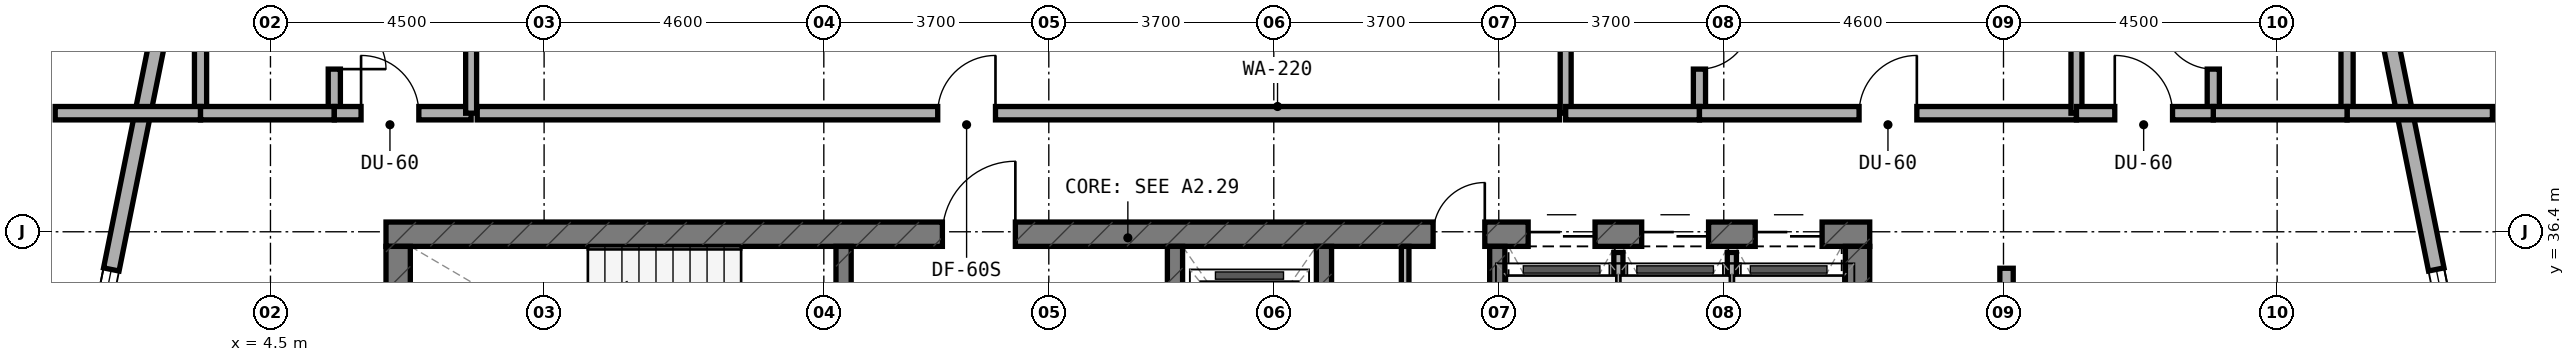
"""IFC4 building model, lengths in metres.
Left out: names, types, materials, properties, quantities, classifications, styles, units other than length and angle.
Written with IfcOpenShell. Run it as: python <this file> out.ifc"""

import sys

from ifc_helpers import new_model, si_unit, direction, frame, frame_2d, origin, place, context, subcontext, project, spatial, rectangle, extrude, element, fill, save


model = new_model("IFC4")
c1 = context("Model", 3, precision=1e-05, world=origin(), true_north=direction((0.0, 1.0)))
c2 = subcontext(c1, "Body", "Model", "MODEL_VIEW")
j1 = project(units=[si_unit("LENGTHUNIT", "METRE"), si_unit("PLANEANGLEUNIT", "RADIAN")], contexts=[c1])
p1 = place(None, origin())
s1 = spatial("IfcSite", under=j1, at=p1, CompositionType="ELEMENT")
p2 = place(p1, origin())
s2 = spatial("IfcBuilding", under=s1, at=p2, CompositionType="ELEMENT")
p3 = place(p2, frame((0.0, 0.0, 127.5)))
s3 = spatial("IfcBuildingStorey", under=s2, at=p3, CompositionType="ELEMENT", Elevation=127.5)
p4 = place(p3, frame((6.4, 36.36, 0.0), z_axis=(0.0, 0.0, 1.0), x_axis=(1.0, 0.0, 0.0)))
e1 = element("IfcWall", 1, at=p4, inside=s3, PredefinedType="SHEAR", context=c2, shape_type="SweptSolid", body=[
    extrude(rectangle(XDim=24.4, YDim=0.4, at=frame_2d((12.2, 0.0))), origin(), (0.0, 0.0, 1.0), 3.5),
])
p5 = place(p4, frame((9.15, 0.0, 0.0)))
e2 = element("IfcOpeningElement", 2, at=p5, cuts=e1, PredefinedType="OPENING", context=c2, shape_type="SweptSolid", body=[
    extrude(rectangle(XDim=1.2, YDim=2.15, at=frame_2d((0.6, 1.075))), frame((0.0, 0.21, 0.0), z_axis=(0.0, -1.0, 0.0), x_axis=(1.0, 0.0, 0.0)), (0.0, 0.0, 1.0), 0.42),
])
p6 = place(p4, frame((17.22, 0.0, 0.0)))
e3 = element("IfcOpeningElement", 3, at=p6, cuts=e1, PredefinedType="OPENING", context=c2, shape_type="SweptSolid", body=[
    extrude(rectangle(XDim=0.85, YDim=2.1, at=frame_2d((0.425, 1.05))), frame((0.0, 0.21, 0.0), z_axis=(0.0, -1.0, 0.0), x_axis=(1.0, 0.0, 0.0)), (0.0, 0.0, 1.0), 0.42),
])
p7 = place(p4, frame((18.783, 0.0, 0.0)))
e4 = element("IfcOpeningElement", 4, at=p7, cuts=e1, PredefinedType="OPENING", context=c2, shape_type="SweptSolid", body=[
    extrude(rectangle(XDim=1.1, YDim=2.15, at=frame_2d((0.55, 1.075))), frame((0.0, 0.21, 0.0), z_axis=(0.0, -1.0, 0.0), x_axis=(1.0, 0.0, 0.0)), (0.0, 0.0, 1.0), 0.42),
])
p8 = place(p4, frame((20.65, 0.0, 0.0)))
e5 = element("IfcOpeningElement", 5, at=p8, cuts=e1, PredefinedType="OPENING", context=c2, shape_type="SweptSolid", body=[
    extrude(rectangle(XDim=1.1, YDim=2.15, at=frame_2d((0.55, 1.075))), frame((0.0, 0.21, 0.0), z_axis=(0.0, -1.0, 0.0), x_axis=(1.0, 0.0, 0.0)), (0.0, 0.0, 1.0), 0.42),
])
p9 = place(p4, frame((22.517, 0.0, 0.0)))
e6 = element("IfcOpeningElement", 6, at=p9, cuts=e1, PredefinedType="OPENING", context=c2, shape_type="SweptSolid", body=[
    extrude(rectangle(XDim=1.1, YDim=2.15, at=frame_2d((0.55, 1.075))), frame((0.0, 0.21, 0.0), z_axis=(0.0, -1.0, 0.0), x_axis=(1.0, 0.0, 0.0)), (0.0, 0.0, 1.0), 0.42),
])
for number, where, z_axis, x_axis in (
    (7, (6.6, 33.0, 0.0), (0.0, 0.0, 1.0), (0.0, 1.0, 0.0)),
    (8, (30.6, 33.0, 0.0), (0.0, 0.0, 1.0), (0.0, 1.0, 0.0)),
):
    element("IfcWall", number, at=place(p3, frame(where, z_axis=z_axis, x_axis=x_axis)), inside=s3, PredefinedType="SHEAR", context=c2, shape_type="SweptSolid", body=[
        extrude(rectangle(XDim=3.16, YDim=0.4, at=frame_2d((1.58, 0.0))), origin(), (0.0, 0.0, 1.0), 3.5),
    ])
p10 = place(p3, frame((13.925, 33.0, 0.0), z_axis=(0.0, 0.0, 1.0), x_axis=(0.0, 1.0, 0.0)))
e9 = element("IfcWall", 9, at=p10, inside=s3, PredefinedType="STANDARD", context=c2, shape_type="SweptSolid", body=[
    extrude(rectangle(XDim=3.16, YDim=0.25, at=frame_2d((1.58, 0.0))), origin(), (0.0, 0.0, 1.0), 3.22),
])
p11 = place(p10, frame((0.98, 0.0, 0.0)))
e10 = element("IfcOpeningElement", 10, at=p11, cuts=e9, PredefinedType="OPENING", context=c2, shape_type="SweptSolid", body=[
    extrude(rectangle(XDim=1.1, YDim=2.15, at=frame_2d((0.55, 1.075))), frame((0.0, 0.135, 0.0), z_axis=(0.0, -1.0, 0.0), x_axis=(1.0, 0.0, 0.0)), (0.0, 0.0, 1.0), 0.27),
])
p12 = place(p3, frame((19.375, 33.0, 0.0), z_axis=(0.0, 0.0, 1.0), x_axis=(0.0, 1.0, 0.0)))
e11 = element("IfcWall", 11, at=p12, inside=s3, PredefinedType="STANDARD", context=c2, shape_type="SweptSolid", body=[
    extrude(rectangle(XDim=3.16, YDim=0.25, at=frame_2d((1.58, 0.0))), origin(), (0.0, 0.0, 1.0), 3.22),
])
p13 = place(p12, frame((0.98, 0.0, 0.0)))
e12 = element("IfcOpeningElement", 12, at=p13, cuts=e11, PredefinedType="OPENING", context=c2, shape_type="SweptSolid", body=[
    extrude(rectangle(XDim=1.1, YDim=2.15, at=frame_2d((0.55, 1.075))), frame((0.0, 0.135, 0.0), z_axis=(0.0, -1.0, 0.0), x_axis=(1.0, 0.0, 0.0)), (0.0, 0.0, 1.0), 0.27),
])
for number, where, z_axis, x_axis in (
    (13, (21.825, 33.0, 0.0), (0.0, 0.0, 1.0), (0.0, 1.0, 0.0)),
    (14, (24.675, 33.0, 0.0), (0.0, 0.0, 1.0), (0.0, 1.0, 0.0)),
):
    element("IfcWall", number, at=place(p3, frame(where, z_axis=z_axis, x_axis=x_axis)), inside=s3, PredefinedType="STANDARD", context=c2, shape_type="SweptSolid", body=[
        extrude(rectangle(XDim=3.16, YDim=0.25, at=frame_2d((1.58, 0.0))), origin(), (0.0, 0.0, 1.0), 3.22),
    ])
p14 = place(p3, frame((41.084, 30.98, 0.0), z_axis=(0.0, 0.0, 1.0), x_axis=(-0.197435082048, 0.980315963543, 0.0)))
e15 = element("IfcWall", 15, at=p14, inside=s3, PredefinedType="STANDARD", context=c2, shape_type="SweptSolid", body=[
    extrude(rectangle(XDim=9.183, YDim=0.26, at=frame_2d((4.591, 0.0))), origin(), (0.0, 0.0, 1.0), 3.22),
])
p15 = place(p14, frame((2.497, 0.0, 0.8)))
e16 = element("IfcOpeningElement", 16, at=p15, cuts=e15, PredefinedType="OPENING", context=c2, shape_type="SweptSolid", body=[
    extrude(rectangle(XDim=2.4, YDim=1.6, at=frame_2d((1.2, 0.8))), frame((0.0, 0.14, 0.0), z_axis=(0.0, -1.0, 0.0), x_axis=(1.0, 0.0, 0.0)), (0.0, 0.0, 1.0), 0.28),
])
p16 = place(p3, frame((2.729, 39.982, 0.0), z_axis=(0.0, 0.0, 1.0), x_axis=(-0.197435082048, -0.980315963543, 0.0)))
e17 = element("IfcWall", 17, at=p16, inside=s3, PredefinedType="STANDARD", context=c2, shape_type="SweptSolid", body=[
    extrude(rectangle(XDim=9.183, YDim=0.26, at=frame_2d((4.591, 0.0))), origin(), (0.0, 0.0, 1.0), 3.22),
])
p17 = place(p16, frame((4.286, 0.0, 0.8)))
e18 = element("IfcOpeningElement", 18, at=p17, cuts=e17, PredefinedType="OPENING", context=c2, shape_type="SweptSolid", body=[
    extrude(rectangle(XDim=2.4, YDim=1.6, at=frame_2d((1.2, 0.8))), frame((0.0, 0.14, 0.0), z_axis=(0.0, -1.0, 0.0), x_axis=(1.0, 0.0, 0.0)), (0.0, 0.0, 1.0), 0.28),
])
p18 = place(p3, frame((23.16, 34.82, 0.0), z_axis=(0.0, 0.0, 1.0), x_axis=(0.0, 1.0, 0.0)))
e19 = element("IfcWall", 19, at=p18, inside=s3, PredefinedType="PARTITIONING", context=c2, shape_type="SweptSolid", body=[
    extrude(rectangle(XDim=1.34, YDim=0.125, at=frame_2d((0.67, 0.0))), origin(), (0.0, 0.0, 1.0), 3.22),
])
p19 = place(p3, frame((26.667, 33.1, 0.0), z_axis=(0.0, 0.0, 1.0), x_axis=(0.0, 1.0, 0.0)))
e20 = element("IfcWall", 20, at=p19, inside=s3, PredefinedType="PARTITIONING", context=c2, shape_type="SweptSolid", body=[
    extrude(rectangle(XDim=2.96, YDim=0.15, at=frame_2d((1.48, 0.0))), origin(), (0.0, 0.0, 1.0), 3.22),
])
p20 = place(p3, frame((28.533, 33.1, 0.0), z_axis=(0.0, 0.0, 1.0), x_axis=(0.0, 1.0, 0.0)))
e21 = element("IfcWall", 21, at=p20, inside=s3, PredefinedType="PARTITIONING", context=c2, shape_type="SweptSolid", body=[
    extrude(rectangle(XDim=2.96, YDim=0.15, at=frame_2d((1.48, 0.0))), origin(), (0.0, 0.0, 1.0), 2.695),
])
p21 = place(p3, frame((5.55, 38.45, 0.0), z_axis=(0.0, 0.0, 1.0), x_axis=(0.0, 1.0, 0.0)))
e22 = element("IfcWall", 22, at=p21, inside=s3, PredefinedType="PLUMBINGWALL", context=c2, shape_type="SweptSolid", body=[
    extrude(rectangle(XDim=2.1, YDim=0.2, at=frame_2d((1.05, 0.0))), origin(), (0.0, 0.0, 1.0), 3.22),
])
p22 = place(p21, frame((0.625, 0.0, 0.0)))
e23 = element("IfcOpeningElement", 23, at=p22, cuts=e22, PredefinedType="OPENING", context=c2, shape_type="SweptSolid", body=[
    extrude(rectangle(XDim=0.85, YDim=2.1, at=frame_2d((0.425, 1.05))), frame((0.0, 0.11, 0.0), z_axis=(0.0, -1.0, 0.0), x_axis=(1.0, 0.0, 0.0)), (0.0, 0.0, 1.0), 0.22),
])
p23 = place(p3, frame((3.35, 38.45, 0.0), z_axis=(0.0, 0.0, 1.0), x_axis=(0.0, 1.0, 0.0)))
e24 = element("IfcWall", 24, at=p23, inside=s3, PredefinedType="PLUMBINGWALL", context=c2, shape_type="SweptSolid", body=[
    extrude(rectangle(XDim=2.1, YDim=0.2, at=frame_2d((1.05, 0.0))), origin(), (0.0, 0.0, 1.0), 3.22),
])
p24 = place(p3, frame((0.96, 38.35, 0.0), z_axis=(0.0, 0.0, 1.0), x_axis=(1.0, 0.0, 0.0)))
e25 = element("IfcWall", 25, at=p24, inside=s3, PredefinedType="SOLIDWALL", context=c2, shape_type="SweptSolid", body=[
    extrude(rectangle(XDim=2.39, YDim=0.22, at=frame_2d((1.195, 0.0))), origin(), (0.0, 0.0, 1.0), 3.22),
])
p25 = place(p3, frame((3.35, 38.35, 0.0), z_axis=(0.0, 0.0, 1.0), x_axis=(1.0, 0.0, 0.0)))
e26 = element("IfcWall", 26, at=p25, inside=s3, PredefinedType="SOLIDWALL", context=c2, shape_type="SweptSolid", body=[
    extrude(rectangle(XDim=2.2, YDim=0.22, at=frame_2d((1.1, 0.0))), origin(), (0.0, 0.0, 1.0), 3.22),
])
p26 = place(p3, frame((5.55, 38.35, 0.0), z_axis=(0.0, 0.0, 1.0), x_axis=(1.0, 0.0, 0.0)))
e27 = element("IfcWall", 27, at=p26, inside=s3, PredefinedType="SOLIDWALL", context=c2, shape_type="SweptSolid", body=[
    extrude(rectangle(XDim=2.25, YDim=0.22, at=frame_2d((1.125, 0.0))), origin(), (0.0, 0.0, 1.0), 2.695),
])
p27 = place(p26, frame((0.44, 0.0, 0.0)))
e28 = element("IfcOpeningElement", 28, at=p27, cuts=e27, PredefinedType="OPENING", context=c2, shape_type="SweptSolid", body=[
    extrude(rectangle(XDim=0.95, YDim=2.1, at=frame_2d((0.475, 1.05))), frame((0.0, 0.12, 0.0), z_axis=(0.0, -1.0, 0.0), x_axis=(1.0, 0.0, 0.0)), (0.0, 0.0, 1.0), 0.24),
])
p28 = place(p3, frame((7.8, 38.35, 0.0), z_axis=(0.0, 0.0, 1.0), x_axis=(0.0, 1.0, 0.0)))
e29 = element("IfcWall", 29, at=p28, inside=s3, PredefinedType="SOLIDWALL", context=c2, shape_type="SweptSolid", body=[
    extrude(rectangle(XDim=5.351, YDim=0.18, at=frame_2d((2.675, 0.0))), origin(), (0.0, 0.0, 1.0), 2.695),
])
p29 = place(p3, frame((7.9, 38.35, 0.0), z_axis=(0.0, 0.0, 1.0), x_axis=(1.0, 0.0, 0.0)))
e30 = element("IfcWall", 30, at=p29, inside=s3, PredefinedType="SOLIDWALL", context=c2, shape_type="SweptSolid", body=[
    extrude(rectangle(XDim=17.8, YDim=0.22, at=frame_2d((8.9, 0.0))), origin(), (0.0, 0.0, 1.0), 2.695),
])
p30 = place(p29, frame((7.573, 0.0, 0.0)))
e31 = element("IfcOpeningElement", 31, at=p30, cuts=e30, PredefinedType="OPENING", context=c2, shape_type="SweptSolid", body=[
    extrude(rectangle(XDim=0.95, YDim=2.1, at=frame_2d((0.475, 1.05))), frame((0.0, 0.12, 0.0), z_axis=(0.0, -1.0, 0.0), x_axis=(1.0, 0.0, 0.0)), (0.0, 0.0, 1.0), 0.24),
])
p31 = place(p3, frame((25.8, 38.35, 0.0), z_axis=(0.0, 0.0, 1.0), x_axis=(0.0, 1.0, 0.0)))
e32 = element("IfcWall", 32, at=p31, inside=s3, PredefinedType="SOLIDWALL", context=c2, shape_type="SweptSolid", body=[
    extrude(rectangle(XDim=6.79, YDim=0.18, at=frame_2d((3.395, 0.0))), origin(), (0.0, 0.0, 1.0), 2.695),
])
p32 = place(p3, frame((28.0, 38.45, 0.0), z_axis=(0.0, 0.0, 1.0), x_axis=(0.0, 1.0, 0.0)))
e33 = element("IfcWall", 33, at=p32, inside=s3, PredefinedType="PLUMBINGWALL", context=c2, shape_type="SweptSolid", body=[
    extrude(rectangle(XDim=2.1, YDim=0.2, at=frame_2d((1.05, 0.0))), origin(), (0.0, 0.0, 1.0), 2.745),
])
p33 = place(p32, frame((0.625, 0.0, 0.0)))
e34 = element("IfcOpeningElement", 34, at=p33, cuts=e33, PredefinedType="OPENING", context=c2, shape_type="SweptSolid", body=[
    extrude(rectangle(XDim=0.85, YDim=2.1, at=frame_2d((0.425, 1.05))), frame((0.0, 0.11, 0.0), z_axis=(0.0, -1.0, 0.0), x_axis=(1.0, 0.0, 0.0)), (0.0, 0.0, 1.0), 0.22),
])
p34 = place(p3, frame((25.8, 38.35, 0.0), z_axis=(0.0, 0.0, 1.0), x_axis=(1.0, 0.0, 0.0)))
e35 = element("IfcWall", 35, at=p34, inside=s3, PredefinedType="SOLIDWALL", context=c2, shape_type="SweptSolid", body=[
    extrude(rectangle(XDim=2.2, YDim=0.22, at=frame_2d((1.1, 0.0))), origin(), (0.0, 0.0, 1.0), 2.695),
])
p35 = place(p3, frame((28.0, 38.35, 0.0), z_axis=(0.0, 0.0, 1.0), x_axis=(1.0, 0.0, 0.0)))
e36 = element("IfcWall", 36, at=p35, inside=s3, PredefinedType="SOLIDWALL", context=c2, shape_type="SweptSolid", body=[
    extrude(rectangle(XDim=6.2, YDim=0.22, at=frame_2d((3.1, 0.0))), origin(), (0.0, 0.0, 1.0), 2.695),
])
p36 = place(p35, frame((2.625, 0.0, 0.0)))
e37 = element("IfcOpeningElement", 37, at=p36, cuts=e36, PredefinedType="OPENING", context=c2, shape_type="SweptSolid", body=[
    extrude(rectangle(XDim=0.95, YDim=2.1, at=frame_2d((0.475, 1.05))), frame((0.0, 0.12, 0.0), z_axis=(0.0, -1.0, 0.0), x_axis=(1.0, 0.0, 0.0)), (0.0, 0.0, 1.0), 0.24),
])
p37 = place(p3, frame((34.2, 38.35, 0.0), z_axis=(0.0, 0.0, 1.0), x_axis=(0.0, 1.0, 0.0)))
e38 = element("IfcWall", 38, at=p37, inside=s3, PredefinedType="SOLIDWALL", context=c2, shape_type="SweptSolid", body=[
    extrude(rectangle(XDim=5.351, YDim=0.18, at=frame_2d((2.675, 0.0))), origin(), (0.0, 0.0, 1.0), 2.695),
])
p38 = place(p3, frame((36.45, 38.45, 0.0), z_axis=(0.0, 0.0, 1.0), x_axis=(0.0, 1.0, 0.0)))
e39 = element("IfcWall", 39, at=p38, inside=s3, PredefinedType="PLUMBINGWALL", context=c2, shape_type="SweptSolid", body=[
    extrude(rectangle(XDim=2.1, YDim=0.2, at=frame_2d((1.05, 0.0))), origin(), (0.0, 0.0, 1.0), 3.22),
])
p39 = place(p38, frame((0.625, 0.0, 0.0)))
e40 = element("IfcOpeningElement", 40, at=p39, cuts=e39, PredefinedType="OPENING", context=c2, shape_type="SweptSolid", body=[
    extrude(rectangle(XDim=0.85, YDim=2.1, at=frame_2d((0.425, 1.05))), frame((0.0, 0.11, 0.0), z_axis=(0.0, -1.0, 0.0), x_axis=(1.0, 0.0, 0.0)), (0.0, 0.0, 1.0), 0.22),
])
p40 = place(p3, frame((38.65, 38.45, 0.0), z_axis=(0.0, 0.0, 1.0), x_axis=(0.0, 1.0, 0.0)))
e41 = element("IfcWall", 41, at=p40, inside=s3, PredefinedType="PLUMBINGWALL", context=c2, shape_type="SweptSolid", body=[
    extrude(rectangle(XDim=2.1, YDim=0.2, at=frame_2d((1.05, 0.0))), origin(), (0.0, 0.0, 1.0), 3.22),
])
p41 = place(p3, frame((38.65, 38.35, 0.0), z_axis=(0.0, 0.0, 1.0), x_axis=(1.0, 0.0, 0.0)))
e42 = element("IfcWall", 42, at=p41, inside=s3, PredefinedType="SOLIDWALL", context=c2, shape_type="SweptSolid", body=[
    extrude(rectangle(XDim=2.39, YDim=0.22, at=frame_2d((1.195, 0.0))), origin(), (0.0, 0.0, 1.0), 3.22),
])
p42 = place(p3, frame((36.45, 38.35, 0.0), z_axis=(0.0, 0.0, 1.0), x_axis=(1.0, 0.0, 0.0)))
e43 = element("IfcWall", 43, at=p42, inside=s3, PredefinedType="SOLIDWALL", context=c2, shape_type="SweptSolid", body=[
    extrude(rectangle(XDim=2.2, YDim=0.22, at=frame_2d((1.1, 0.0))), origin(), (0.0, 0.0, 1.0), 3.22),
])
p43 = place(p3, frame((34.2, 38.35, 0.0), z_axis=(0.0, 0.0, 1.0), x_axis=(1.0, 0.0, 0.0)))
e44 = element("IfcWall", 44, at=p43, inside=s3, PredefinedType="SOLIDWALL", context=c2, shape_type="SweptSolid", body=[
    extrude(rectangle(XDim=2.25, YDim=0.22, at=frame_2d((1.125, 0.0))), origin(), (0.0, 0.0, 1.0), 2.695),
])
p44 = place(p43, frame((0.63, 0.0, 0.0)))
e45 = element("IfcOpeningElement", 45, at=p44, cuts=e44, PredefinedType="OPENING", context=c2, shape_type="SweptSolid", body=[
    extrude(rectangle(XDim=0.95, YDim=2.1, at=frame_2d((0.475, 1.05))), frame((0.0, 0.12, 0.0), z_axis=(0.0, -1.0, 0.0), x_axis=(1.0, 0.0, 0.0)), (0.0, 0.0, 1.0), 0.24),
])
p45 = place(p3, frame((33.05, 27.2, 0.0), z_axis=(0.0, 0.0, 1.0), x_axis=(0.0, 1.0, 0.0)))
e46 = element("IfcWall", 46, at=p45, inside=s3, PredefinedType="SOLIDWALL", context=c2, shape_type="SweptSolid", body=[
    extrude(rectangle(XDim=8.6, YDim=0.22, at=frame_2d((4.3, 0.0))), origin(), (0.0, 0.0, 1.0), 2.695),
])
p46 = place(p45, frame((3.825, 0.0, 0.0)))
e47 = element("IfcOpeningElement", 47, at=p46, cuts=e46, PredefinedType="OPENING", context=c2, shape_type="SweptSolid", body=[
    extrude(rectangle(XDim=0.95, YDim=2.1, at=frame_2d((0.475, 1.05))), frame((0.0, 0.12, 0.0), z_axis=(0.0, -1.0, 0.0), x_axis=(1.0, 0.0, 0.0)), (0.0, 0.0, 1.0), 0.24),
])
p47 = place(p15, origin())
e48 = element("IfcWindow", 48, at=p47, inside=s3, PartitioningType="SINGLE_PANEL", PredefinedType="WINDOW", context=c2, shape_type="SweptSolid", body=[
    extrude(rectangle(XDim=2.4, YDim=1.6, at=frame_2d((1.2, 0.8))), frame((0.0, 0.03, 0.0), z_axis=(0.0, -1.0, 0.0), x_axis=(1.0, 0.0, 0.0)), (0.0, 0.0, 1.0), 0.06),
])
fill(e16, e48)
p48 = place(p17, origin())
e49 = element("IfcWindow", 49, at=p48, inside=s3, PartitioningType="SINGLE_PANEL", PredefinedType="WINDOW", context=c2, shape_type="SweptSolid", body=[
    extrude(rectangle(XDim=2.4, YDim=1.6, at=frame_2d((1.2, 0.8))), frame((0.0, 0.03, 0.0), z_axis=(0.0, -1.0, 0.0), x_axis=(1.0, 0.0, 0.0)), (0.0, 0.0, 1.0), 0.06),
])
fill(e18, e49)
p49 = place(p5, origin())
e50 = element("IfcDoor", 50, at=p49, inside=s3, OperationType="SINGLE_SWING_RIGHT", PredefinedType="DOOR", context=c2, shape_type="SweptSolid", body=[
    extrude(rectangle(XDim=1.2, YDim=2.15, at=frame_2d((0.6, 1.075))), frame((0.0, 0.025, 0.0), z_axis=(0.0, -1.0, 0.0), x_axis=(1.0, 0.0, 0.0)), (0.0, 0.0, 1.0), 0.05),
])
fill(e2, e50)
p50 = place(p6, origin())
e51 = element("IfcDoor", 51, at=p50, inside=s3, OperationType="SINGLE_SWING_RIGHT", PredefinedType="DOOR", context=c2, shape_type="SweptSolid", body=[
    extrude(rectangle(XDim=0.85, YDim=2.1, at=frame_2d((0.425, 1.05))), frame((0.0, 0.025, 0.0), z_axis=(0.0, -1.0, 0.0), x_axis=(1.0, 0.0, 0.0)), (0.0, 0.0, 1.0), 0.05),
])
fill(e3, e51)
p51 = place(p7, origin())
e52 = element("IfcDoor", 52, at=p51, inside=s3, OperationType="DOUBLE_DOOR_SLIDING", PredefinedType="DOOR", context=c2, shape_type="SweptSolid", body=[
    extrude(rectangle(XDim=1.1, YDim=2.15, at=frame_2d((0.55, 1.075))), frame((0.0, 0.025, 0.0), z_axis=(0.0, -1.0, 0.0), x_axis=(1.0, 0.0, 0.0)), (0.0, 0.0, 1.0), 0.05),
])
fill(e4, e52)
p52 = place(p8, origin())
e53 = element("IfcDoor", 53, at=p52, inside=s3, OperationType="DOUBLE_DOOR_SLIDING", PredefinedType="DOOR", context=c2, shape_type="SweptSolid", body=[
    extrude(rectangle(XDim=1.1, YDim=2.15, at=frame_2d((0.55, 1.075))), frame((0.0, 0.025, 0.0), z_axis=(0.0, -1.0, 0.0), x_axis=(1.0, 0.0, 0.0)), (0.0, 0.0, 1.0), 0.05),
])
fill(e5, e53)
p53 = place(p9, origin())
e54 = element("IfcDoor", 54, at=p53, inside=s3, OperationType="DOUBLE_DOOR_SLIDING", PredefinedType="DOOR", context=c2, shape_type="SweptSolid", body=[
    extrude(rectangle(XDim=1.1, YDim=2.15, at=frame_2d((0.55, 1.075))), frame((0.0, 0.025, 0.0), z_axis=(0.0, -1.0, 0.0), x_axis=(1.0, 0.0, 0.0)), (0.0, 0.0, 1.0), 0.05),
])
fill(e6, e54)
p54 = place(p22, frame((0.85, 0.0, 0.0), z_axis=(0.0, 0.0, 1.0), x_axis=(-1.0, 0.0, 0.0)))
e55 = element("IfcDoor", 55, at=p54, inside=s3, OperationType="SINGLE_SWING_RIGHT", PredefinedType="DOOR", context=c2, shape_type="SweptSolid", body=[
    extrude(rectangle(XDim=0.85, YDim=2.1, at=frame_2d((0.425, 1.05))), frame((0.0, 0.025, 0.0), z_axis=(0.0, -1.0, 0.0), x_axis=(1.0, 0.0, 0.0)), (0.0, 0.0, 1.0), 0.05),
])
fill(e23, e55)
p55 = place(p27, origin())
e56 = element("IfcDoor", 56, at=p55, inside=s3, OperationType="SINGLE_SWING_LEFT", PredefinedType="DOOR", context=c2, shape_type="SweptSolid", body=[
    extrude(rectangle(XDim=0.95, YDim=2.1, at=frame_2d((0.475, 1.05))), frame((0.0, 0.025, 0.0), z_axis=(0.0, -1.0, 0.0), x_axis=(1.0, 0.0, 0.0)), (0.0, 0.0, 1.0), 0.05),
])
fill(e28, e56)
p56 = place(p30, origin())
e57 = element("IfcDoor", 57, at=p56, inside=s3, OperationType="SINGLE_SWING_RIGHT", PredefinedType="DOOR", context=c2, shape_type="SweptSolid", body=[
    extrude(rectangle(XDim=0.95, YDim=2.1, at=frame_2d((0.475, 1.05))), frame((0.0, 0.025, 0.0), z_axis=(0.0, -1.0, 0.0), x_axis=(1.0, 0.0, 0.0)), (0.0, 0.0, 1.0), 0.05),
])
fill(e31, e57)
p57 = place(p33, frame((0.85, 0.0, 0.0), z_axis=(0.0, 0.0, 1.0), x_axis=(-1.0, 0.0, 0.0)))
e58 = element("IfcDoor", 58, at=p57, inside=s3, OperationType="SINGLE_SWING_LEFT", PredefinedType="DOOR", context=c2, shape_type="SweptSolid", body=[
    extrude(rectangle(XDim=0.85, YDim=2.1, at=frame_2d((0.425, 1.05))), frame((0.0, 0.025, 0.0), z_axis=(0.0, -1.0, 0.0), x_axis=(1.0, 0.0, 0.0)), (0.0, 0.0, 1.0), 0.05),
])
fill(e34, e58)
p58 = place(p36, origin())
e59 = element("IfcDoor", 59, at=p58, inside=s3, OperationType="SINGLE_SWING_RIGHT", PredefinedType="DOOR", context=c2, shape_type="SweptSolid", body=[
    extrude(rectangle(XDim=0.95, YDim=2.1, at=frame_2d((0.475, 1.05))), frame((0.0, 0.025, 0.0), z_axis=(0.0, -1.0, 0.0), x_axis=(1.0, 0.0, 0.0)), (0.0, 0.0, 1.0), 0.05),
])
fill(e37, e59)
p59 = place(p39, origin())
e60 = element("IfcDoor", 60, at=p59, inside=s3, OperationType="SINGLE_SWING_RIGHT", PredefinedType="DOOR", context=c2, shape_type="SweptSolid", body=[
    extrude(rectangle(XDim=0.85, YDim=2.1, at=frame_2d((0.425, 1.05))), frame((0.0, 0.025, 0.0), z_axis=(0.0, -1.0, 0.0), x_axis=(1.0, 0.0, 0.0)), (0.0, 0.0, 1.0), 0.05),
])
fill(e40, e60)
p60 = place(p44, origin())
e61 = element("IfcDoor", 61, at=p60, inside=s3, OperationType="SINGLE_SWING_LEFT", PredefinedType="DOOR", context=c2, shape_type="SweptSolid", body=[
    extrude(rectangle(XDim=0.95, YDim=2.1, at=frame_2d((0.475, 1.05))), frame((0.0, 0.025, 0.0), z_axis=(0.0, -1.0, 0.0), x_axis=(1.0, 0.0, 0.0)), (0.0, 0.0, 1.0), 0.05),
])
fill(e45, e61)
save(model, sys.argv[1])
